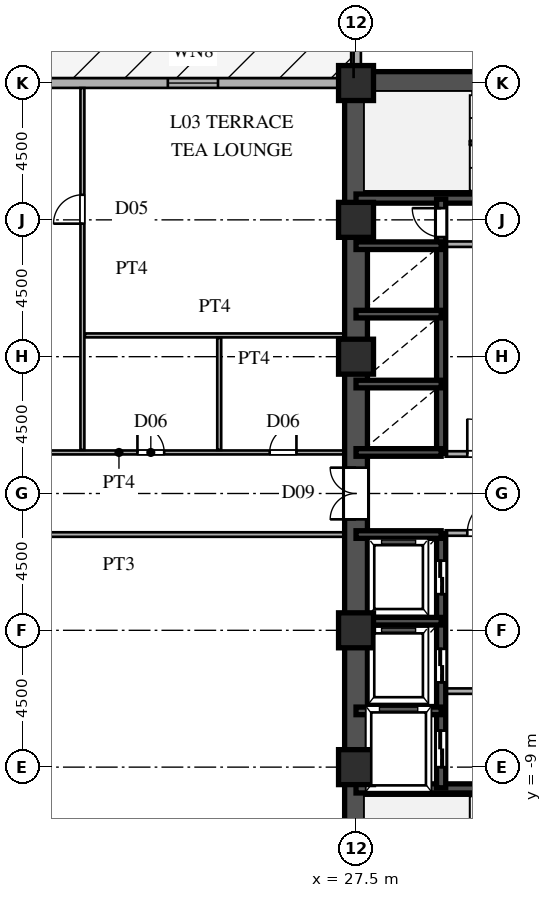
"""IFC4 building model, lengths in metres.
Left out: names, types, materials, properties, quantities, classifications, styles, units other than length and angle.
Written with IfcOpenShell. Run it as: python <this file> out.ifc"""

import sys

from ifc_helpers import new_model, si_unit, direction, frame, frame_2d, origin, origin_2d, place, context, subcontext, project, spatial, rectangle, hollow_rectangle, extrude, source, transform, mapped, element, fill, save


model = new_model("IFC4")
c1 = context("Model", 3, precision=1e-05, world=origin(), true_north=direction((0.0, 1.0)))
c2 = subcontext(c1, "Body", "Model", "MODEL_VIEW")
j1 = project(units=[si_unit("LENGTHUNIT", "METRE"), si_unit("PLANEANGLEUNIT", "RADIAN")], contexts=[c1])
p1 = place(None, origin())
s1 = spatial("IfcSite", under=j1, at=p1, CompositionType="ELEMENT")
p2 = place(p1, origin())
s2 = spatial("IfcBuilding", under=s1, at=p2, CompositionType="ELEMENT")
p3 = place(p2, frame((0.0, 0.0, 14.4)))
s3 = spatial("IfcBuildingStorey", under=s2, at=p3, CompositionType="ELEMENT", Elevation=14.4)
m1 = source(origin(), c2, "Body", "SweptSolid", [
    extrude(hollow_rectangle(XDim=1.15, YDim=1.15, WallThickness=0.048, at=origin_2d()), origin(), (0.0, 0.0, 1.0), 4.5),
])
for number, where, z_axis, x_axis in (
    (1, (27.5, -9.0, 0.0), (0.0, 0.0, 1.0), (1.0, 0.0, 0.0)),
    (2, (27.5, -4.5, 0.0), (0.0, 0.0, 1.0), (1.0, 0.0, 0.0)),
    (3, (27.5, 4.5, 0.0), (0.0, 0.0, 1.0), (1.0, 0.0, 0.0)),
    (4, (27.5, 9.0, 0.0), (0.0, 0.0, 1.0), (1.0, 0.0, 0.0)),
    (5, (27.5, 13.5, 0.0), (0.0, 0.0, 1.0), (1.0, 0.0, 0.0)),
):
    element("IfcColumn", number, at=place(p3, frame(where, z_axis=z_axis, x_axis=x_axis)), inside=s3, PredefinedType="COLUMN", context=c2, shape_type="MappedRepresentation", body=[
        mapped(m1, transform((0.0, 0.0, 0.0), scale=1.0)),
    ])
p4 = place(p3, frame((30.537, -26.985, 0.0), z_axis=(0.0, 0.0, 1.0), x_axis=(0.926944846568, 0.375197616492, 0.0)))
e6 = element("IfcWall", 6, at=p4, inside=s3, PredefinedType="SOLIDWALL", context=c2, shape_type="SweptSolid", body=[
    extrude(rectangle(XDim=45.23, YDim=0.32, at=frame_2d((22.615, 0.0))), origin(), (0.0, 0.0, 1.0), 4.28),
])
p5 = place(p4, frame((6.0, 0.0, 0.85)))
e7 = element("IfcOpeningElement", 7, at=p5, cuts=e6, PredefinedType="OPENING", context=c2, shape_type="SweptSolid", body=[
    extrude(rectangle(XDim=1.8, YDim=2.0, at=frame_2d((0.9, 1.0))), frame((0.0, 0.17, 0.0), z_axis=(0.0, -1.0, 0.0), x_axis=(1.0, 0.0, 0.0)), (0.0, 0.0, 1.0), 0.34),
])
p6 = place(p4, frame((36.23, 0.0, 0.85)))
e8 = element("IfcOpeningElement", 8, at=p6, cuts=e6, PredefinedType="OPENING", context=c2, shape_type="SweptSolid", body=[
    extrude(rectangle(XDim=1.8, YDim=2.0, at=frame_2d((0.9, 1.0))), frame((0.0, 0.17, 0.0), z_axis=(0.0, -1.0, 0.0), x_axis=(1.0, 0.0, 0.0)), (0.0, 0.0, 1.0), 0.34),
])
p7 = place(p3, frame((72.463, 10.015, 0.0), z_axis=(0.0, 0.0, 1.0), x_axis=(-0.926944846568, 0.375197616492, 0.0)))
e9 = element("IfcWall", 9, at=p7, inside=s3, PredefinedType="SOLIDWALL", context=c2, shape_type="SweptSolid", body=[
    extrude(rectangle(XDim=45.23, YDim=0.32, at=frame_2d((22.615, 0.0))), origin(), (0.0, 0.0, 1.0), 4.28),
])
p8 = place(p7, frame((6.0, 0.0, 0.85)))
e10 = element("IfcOpeningElement", 10, at=p8, cuts=e9, PredefinedType="OPENING", context=c2, shape_type="SweptSolid", body=[
    extrude(rectangle(XDim=1.8, YDim=2.0, at=frame_2d((0.9, 1.0))), frame((0.0, 0.17, 0.0), z_axis=(0.0, -1.0, 0.0), x_axis=(1.0, 0.0, 0.0)), (0.0, 0.0, 1.0), 0.34),
])
p9 = place(p7, frame((36.23, 0.0, 0.85)))
e11 = element("IfcOpeningElement", 11, at=p9, cuts=e9, PredefinedType="OPENING", context=c2, shape_type="SweptSolid", body=[
    extrude(rectangle(XDim=1.8, YDim=2.0, at=frame_2d((0.9, 1.0))), frame((0.0, 0.17, 0.0), z_axis=(0.0, -1.0, 0.0), x_axis=(1.0, 0.0, 0.0)), (0.0, 0.0, 1.0), 0.34),
])
p10 = place(p3, frame((27.5, 13.55, 0.0), z_axis=(0.0, 0.0, 1.0), x_axis=(0.0, 1.0, 0.0)))
e12 = element("IfcWall", 12, at=p10, inside=s3, PredefinedType="SOLIDWALL", context=c2, shape_type="SweptSolid", body=[
    extrude(rectangle(XDim=10.4, YDim=0.32, at=frame_2d((5.2, 0.0))), origin(), (0.0, 0.0, 1.0), 2.78),
])
p11 = place(p3, frame((27.46, 13.5, 0.0), z_axis=(0.0, 0.0, 1.0), x_axis=(-1.0, 0.0, 0.0)))
e13 = element("IfcWall", 13, at=p11, inside=s3, PredefinedType="SOLIDWALL", context=c2, shape_type="SweptSolid", body=[
    extrude(rectangle(XDim=54.92, YDim=0.32, at=frame_2d((27.46, 0.0))), origin(), (0.0, 0.0, 1.0), 4.28),
])
p12 = place(p11, frame((34.4, 0.0, 0.0)))
e14 = element("IfcOpeningElement", 14, at=p12, cuts=e13, PredefinedType="OPENING", context=c2, shape_type="SweptSolid", body=[
    extrude(rectangle(XDim=1.8, YDim=2.3, at=frame_2d((0.9, 1.15))), frame((0.0, 0.17, 0.0), z_axis=(0.0, -1.0, 0.0), x_axis=(1.0, 0.0, 0.0)), (0.0, 0.0, 1.0), 0.34),
])
p13 = place(p11, frame((37.4, 0.0, 0.0)))
e15 = element("IfcOpeningElement", 15, at=p13, cuts=e13, PredefinedType="OPENING", context=c2, shape_type="SweptSolid", body=[
    extrude(rectangle(XDim=1.8, YDim=2.3, at=frame_2d((0.9, 1.15))), frame((0.0, 0.17, 0.0), z_axis=(0.0, -1.0, 0.0), x_axis=(1.0, 0.0, 0.0)), (0.0, 0.0, 1.0), 0.34),
])
p14 = place(p11, frame((4.5, 0.0, 0.8)))
e16 = element("IfcOpeningElement", 16, at=p14, cuts=e13, PredefinedType="OPENING", context=c2, shape_type="SweptSolid", body=[
    extrude(rectangle(XDim=1.65, YDim=1.85, at=frame_2d((0.825, 0.925))), frame((0.0, 0.17, 0.0), z_axis=(0.0, -1.0, 0.0), x_axis=(1.0, 0.0, 0.0)), (0.0, 0.0, 1.0), 0.34),
])
p15 = place(p11, frame((25.0, 0.0, 0.8)))
e17 = element("IfcOpeningElement", 17, at=p15, cuts=e13, PredefinedType="OPENING", context=c2, shape_type="SweptSolid", body=[
    extrude(rectangle(XDim=1.65, YDim=1.85, at=frame_2d((0.825, 0.925))), frame((0.0, 0.17, 0.0), z_axis=(0.0, -1.0, 0.0), x_axis=(1.0, 0.0, 0.0)), (0.0, 0.0, 1.0), 0.34),
])
p16 = place(p11, frame((46.42, 0.0, 0.8)))
e18 = element("IfcOpeningElement", 18, at=p16, cuts=e13, PredefinedType="OPENING", context=c2, shape_type="SweptSolid", body=[
    extrude(rectangle(XDim=1.65, YDim=1.85, at=frame_2d((0.825, 0.925))), frame((0.0, 0.17, 0.0), z_axis=(0.0, -1.0, 0.0), x_axis=(1.0, 0.0, 0.0)), (0.0, 0.0, 1.0), 0.34),
])
for number, where, z_axis, x_axis in (
    (19, (27.5, -13.5, 0.0), (0.0, 0.0, 1.0), (0.0, 1.0, 0.0)),
    (20, (27.5, 1.3, 0.0), (0.0, 0.0, 1.0), (0.0, 1.0, 0.0)),
):
    element("IfcWall", number, at=place(p3, frame(where, z_axis=z_axis, x_axis=x_axis)), inside=s3, PredefinedType="SHEAR", context=c2, shape_type="SweptSolid", body=[
        extrude(rectangle(XDim=12.2, YDim=0.75, at=frame_2d((6.1, 0.0))), origin(), (0.0, 0.0, 1.0), 4.28),
    ])
p17 = place(p3, frame((27.5, -1.3, 0.0), z_axis=(0.0, 0.0, 1.0), x_axis=(0.0, 1.0, 0.0)))
e21 = element("IfcWall", 21, at=p17, inside=s3, PredefinedType="SHEAR", context=c2, shape_type="SweptSolid", body=[
    extrude(rectangle(XDim=2.6, YDim=0.75, at=frame_2d((1.3, 0.0))), origin(), (0.0, 0.0, 1.0), 4.28),
])
p18 = place(p17, frame((0.45, 0.0, 0.0)))
e22 = element("IfcOpeningElement", 22, at=p18, cuts=e21, PredefinedType="OPENING", context=c2, shape_type="SweptSolid", body=[
    extrude(rectangle(XDim=1.7, YDim=2.35, at=frame_2d((0.85, 1.175))), frame((0.0, 0.385, 0.0), z_axis=(0.0, -1.0, 0.0), x_axis=(1.0, 0.0, 0.0)), (0.0, 0.0, 1.0), 0.77),
])
p19 = place(p3, frame((27.5, 13.5, 0.0), z_axis=(0.0, 0.0, 1.0), x_axis=(1.0, 0.0, 0.0)))
e23 = element("IfcWall", 23, at=p19, inside=s3, PredefinedType="SHEAR", context=c2, shape_type="SweptSolid", body=[
    extrude(rectangle(XDim=9.0, YDim=0.75, at=frame_2d((4.5, 0.0))), origin(), (0.0, 0.0, 1.0), 4.28),
])
p20 = place(p3, frame((27.5, -9.7, 0.0), z_axis=(0.0, 0.0, 1.0), x_axis=(1.0, 0.0, 0.0)))
e24 = element("IfcWall", 24, at=p20, inside=s3, PredefinedType="SHEAR", context=c2, shape_type="SweptSolid", body=[
    extrude(rectangle(XDim=9.0, YDim=0.3, at=frame_2d((4.5, 0.0))), origin(), (0.0, 0.0, 1.0), 4.28),
])
p21 = place(p20, frame((7.3, 0.0, 0.0)))
e25 = element("IfcOpeningElement", 25, at=p21, cuts=e24, PredefinedType="OPENING", context=c2, shape_type="SweptSolid", body=[
    extrude(rectangle(XDim=1.1, YDim=2.2, at=frame_2d((0.55, 1.1))), frame((0.0, 0.16, 0.0), z_axis=(0.0, -1.0, 0.0), x_axis=(1.0, 0.0, 0.0)), (0.0, 0.0, 1.0), 0.32),
])
p22 = place(p3, frame((27.5, 9.7, 0.0), z_axis=(0.0, 0.0, 1.0), x_axis=(1.0, 0.0, 0.0)))
e26 = element("IfcWall", 26, at=p22, inside=s3, PredefinedType="SHEAR", context=c2, shape_type="SweptSolid", body=[
    extrude(rectangle(XDim=9.0, YDim=0.3, at=frame_2d((4.5, 0.0))), origin(), (0.0, 0.0, 1.0), 4.28),
])
p23 = place(p22, frame((7.3, 0.0, 0.0)))
e27 = element("IfcOpeningElement", 27, at=p23, cuts=e26, PredefinedType="OPENING", context=c2, shape_type="SweptSolid", body=[
    extrude(rectangle(XDim=1.1, YDim=2.2, at=frame_2d((0.55, 1.1))), frame((0.0, 0.16, 0.0), z_axis=(0.0, -1.0, 0.0), x_axis=(1.0, 0.0, 0.0)), (0.0, 0.0, 1.0), 0.32),
])
for number, where, z_axis, x_axis in (
    (28, (27.5, -7.15, 0.0), (0.0, 0.0, 1.0), (1.0, 0.0, 0.0)),
    (29, (27.5, -4.2, 0.0), (0.0, 0.0, 1.0), (1.0, 0.0, 0.0)),
    (30, (27.5, -1.35, 0.0), (0.0, 0.0, 1.0), (1.0, 0.0, 0.0)),
    (31, (27.5, 1.35, 0.0), (0.0, 0.0, 1.0), (1.0, 0.0, 0.0)),
    (32, (27.5, 3.6, 0.0), (0.0, 0.0, 1.0), (1.0, 0.0, 0.0)),
    (33, (27.5, 5.9, 0.0), (0.0, 0.0, 1.0), (1.0, 0.0, 0.0)),
    (34, (27.5, 8.15, 0.0), (0.0, 0.0, 1.0), (1.0, 0.0, 0.0)),
):
    element("IfcWall", number, at=place(p3, frame(where, z_axis=z_axis, x_axis=x_axis)), inside=s3, PredefinedType="SHEAR", context=c2, shape_type="SweptSolid", body=[
        extrude(rectangle(XDim=2.8, YDim=0.25, at=frame_2d((1.4, 0.0))), origin(), (0.0, 0.0, 1.0), 4.28),
    ])
p24 = place(p3, frame((30.3, -9.68, 0.0), z_axis=(0.0, 0.0, 1.0), x_axis=(0.0, 1.0, 0.0)))
e35 = element("IfcWall", 35, at=p24, inside=s3, PredefinedType="SHEAR", context=c2, shape_type="SweptSolid", body=[
    extrude(rectangle(XDim=2.56, YDim=0.3, at=frame_2d((1.28, 0.0))), origin(), (0.0, 0.0, 1.0), 4.28),
])
p25 = place(p24, frame((0.68, 0.0, 0.0)))
e36 = element("IfcOpeningElement", 36, at=p25, cuts=e35, PredefinedType="OPENING", context=c2, shape_type="SweptSolid", body=[
    extrude(rectangle(XDim=1.2, YDim=2.25, at=frame_2d((0.6, 1.125))), frame((0.0, 0.16, 0.0), z_axis=(0.0, -1.0, 0.0), x_axis=(1.0, 0.0, 0.0)), (0.0, 0.0, 1.0), 0.32),
])
p26 = place(p3, frame((30.3, -7.12, 0.0), z_axis=(0.0, 0.0, 1.0), x_axis=(0.0, 1.0, 0.0)))
e37 = element("IfcWall", 37, at=p26, inside=s3, PredefinedType="SHEAR", context=c2, shape_type="SweptSolid", body=[
    extrude(rectangle(XDim=2.92, YDim=0.3, at=frame_2d((1.46, 0.0))), origin(), (0.0, 0.0, 1.0), 4.28),
])
p27 = place(p26, frame((0.91, 0.0, 0.0)))
e38 = element("IfcOpeningElement", 38, at=p27, cuts=e37, PredefinedType="OPENING", context=c2, shape_type="SweptSolid", body=[
    extrude(rectangle(XDim=1.1, YDim=2.2, at=frame_2d((0.55, 1.1))), frame((0.0, 0.16, 0.0), z_axis=(0.0, -1.0, 0.0), x_axis=(1.0, 0.0, 0.0)), (0.0, 0.0, 1.0), 0.32),
])
p28 = place(p3, frame((30.3, -4.2, 0.0), z_axis=(0.0, 0.0, 1.0), x_axis=(0.0, 1.0, 0.0)))
e39 = element("IfcWall", 39, at=p28, inside=s3, PredefinedType="SHEAR", context=c2, shape_type="SweptSolid", body=[
    extrude(rectangle(XDim=2.88, YDim=0.3, at=frame_2d((1.44, 0.0))), origin(), (0.0, 0.0, 1.0), 4.28),
])
p29 = place(p28, frame((0.89, 0.0, 0.0)))
e40 = element("IfcOpeningElement", 40, at=p29, cuts=e39, PredefinedType="OPENING", context=c2, shape_type="SweptSolid", body=[
    extrude(rectangle(XDim=1.1, YDim=2.2, at=frame_2d((0.55, 1.1))), frame((0.0, 0.16, 0.0), z_axis=(0.0, -1.0, 0.0), x_axis=(1.0, 0.0, 0.0)), (0.0, 0.0, 1.0), 0.32),
])
p30 = place(p3, frame((30.3, 1.32, 0.0), z_axis=(0.0, 0.0, 1.0), x_axis=(0.0, 1.0, 0.0)))
e41 = element("IfcWall", 41, at=p30, inside=s3, PredefinedType="SHEAR", context=c2, shape_type="SweptSolid", body=[
    extrude(rectangle(XDim=2.28, YDim=0.3, at=frame_2d((1.14, 0.0))), origin(), (0.0, 0.0, 1.0), 4.28),
])
p31 = place(p3, frame((30.3, 3.6, 0.0), z_axis=(0.0, 0.0, 1.0), x_axis=(0.0, 1.0, 0.0)))
e42 = element("IfcWall", 42, at=p31, inside=s3, PredefinedType="SHEAR", context=c2, shape_type="SweptSolid", body=[
    extrude(rectangle(XDim=2.3, YDim=0.3, at=frame_2d((1.15, 0.0))), origin(), (0.0, 0.0, 1.0), 4.28),
])
p32 = place(p3, frame((30.3, 5.9, 0.0), z_axis=(0.0, 0.0, 1.0), x_axis=(0.0, 1.0, 0.0)))
e43 = element("IfcWall", 43, at=p32, inside=s3, PredefinedType="SHEAR", context=c2, shape_type="SweptSolid", body=[
    extrude(rectangle(XDim=2.25, YDim=0.3, at=frame_2d((1.125, 0.0))), origin(), (0.0, 0.0, 1.0), 4.28),
])
p33 = place(p3, frame((30.3, 8.15, 0.0), z_axis=(0.0, 0.0, 1.0), x_axis=(0.0, 1.0, 0.0)))
e44 = element("IfcWall", 44, at=p33, inside=s3, PredefinedType="SHEAR", context=c2, shape_type="SweptSolid", body=[
    extrude(rectangle(XDim=1.53, YDim=0.3, at=frame_2d((0.765, 0.0))), origin(), (0.0, 0.0, 1.0), 4.28),
])
p34 = place(p33, frame((0.285, 0.0, 0.0)))
e45 = element("IfcOpeningElement", 45, at=p34, cuts=e44, PredefinedType="OPENING", context=c2, shape_type="SweptSolid", body=[
    extrude(rectangle(XDim=0.95, YDim=2.15, at=frame_2d((0.475, 1.075))), frame((0.0, 0.16, 0.0), z_axis=(0.0, -1.0, 0.0), x_axis=(1.0, 0.0, 0.0)), (0.0, 0.0, 1.0), 0.32),
])
for number, where, z_axis, x_axis in (
    (46, (30.45, -6.5, 0.0), (0.0, 0.0, 1.0), (1.0, 0.0, 0.0)),
    (47, (30.45, 8.2, 0.0), (0.0, 0.0, 1.0), (1.0, 0.0, 0.0)),
):
    element("IfcWall", number, at=place(p3, frame(where, z_axis=z_axis, x_axis=x_axis)), inside=s3, PredefinedType="PARTITIONING", context=c2, shape_type="SweptSolid", body=[
        extrude(rectangle(XDim=5.7, YDim=0.18, at=frame_2d((2.85, 0.0))), origin(), (0.0, 0.0, 1.0), 4.28),
    ])
p35 = place(p3, frame((30.45, -1.3, 0.0), z_axis=(0.0, 0.0, 1.0), x_axis=(1.0, 0.0, 0.0)))
e48 = element("IfcWall", 48, at=p35, inside=s3, PredefinedType="PARTITIONING", context=c2, shape_type="SweptSolid", body=[
    extrude(rectangle(XDim=2.57, YDim=0.18, at=frame_2d((1.285, 0.0))), origin(), (0.0, 0.0, 1.0), 4.28),
])
p36 = place(p35, frame((0.71, 0.0, 0.0)))
e49 = element("IfcOpeningElement", 49, at=p36, cuts=e48, PredefinedType="OPENING", context=c2, shape_type="SweptSolid", body=[
    extrude(rectangle(XDim=1.15, YDim=2.2, at=frame_2d((0.575, 1.1))), frame((0.0, 0.1, 0.0), z_axis=(0.0, -1.0, 0.0), x_axis=(1.0, 0.0, 0.0)), (0.0, 0.0, 1.0), 0.2),
])
p37 = place(p3, frame((30.45, 1.3, 0.0), z_axis=(0.0, 0.0, 1.0), x_axis=(1.0, 0.0, 0.0)))
e50 = element("IfcWall", 50, at=p37, inside=s3, PredefinedType="PARTITIONING", context=c2, shape_type="SweptSolid", body=[
    extrude(rectangle(XDim=2.57, YDim=0.18, at=frame_2d((1.285, 0.0))), origin(), (0.0, 0.0, 1.0), 4.28),
])
p38 = place(p37, frame((0.71, 0.0, 0.0)))
e51 = element("IfcOpeningElement", 51, at=p38, cuts=e50, PredefinedType="OPENING", context=c2, shape_type="SweptSolid", body=[
    extrude(rectangle(XDim=1.15, YDim=2.2, at=frame_2d((0.575, 1.1))), frame((0.0, 0.1, 0.0), z_axis=(0.0, -1.0, 0.0), x_axis=(1.0, 0.0, 0.0)), (0.0, 0.0, 1.0), 0.2),
])
p39 = place(p3, frame((12.285, -1.35, 0.0), z_axis=(0.0, 0.0, 1.0), x_axis=(1.0, 0.0, 0.0)))
e52 = element("IfcWall", 52, at=p39, inside=s3, PredefinedType="PARTITIONING", context=c2, shape_type="SweptSolid", body=[
    extrude(rectangle(XDim=14.835, YDim=0.15, at=frame_2d((7.417, 0.0))), origin(), (0.0, 0.0, 1.0), 4.28),
])
p40 = place(p3, frame((12.285, 1.35, 0.0), z_axis=(0.0, 0.0, 1.0), x_axis=(1.0, 0.0, 0.0)))
e53 = element("IfcWall", 53, at=p40, inside=s3, PredefinedType="PARTITIONING", context=c2, shape_type="SweptSolid", body=[
    extrude(rectangle(XDim=14.835, YDim=0.13, at=frame_2d((7.417, 0.0))), origin(), (0.0, 0.0, 1.0), 4.28),
])
p41 = place(p40, frame((8.025, 0.0, 0.0)))
e54 = element("IfcOpeningElement", 54, at=p41, cuts=e53, PredefinedType="OPENING", context=c2, shape_type="SweptSolid", body=[
    extrude(rectangle(XDim=0.88, YDim=2.1, at=frame_2d((0.44, 1.05))), frame((0.0, 0.075, 0.0), z_axis=(0.0, -1.0, 0.0), x_axis=(1.0, 0.0, 0.0)), (0.0, 0.0, 1.0), 0.15),
])
p42 = place(p40, frame((12.375, 0.0, 0.0)))
e55 = element("IfcOpeningElement", 55, at=p42, cuts=e53, PredefinedType="OPENING", context=c2, shape_type="SweptSolid", body=[
    extrude(rectangle(XDim=0.88, YDim=2.1, at=frame_2d((0.44, 1.05))), frame((0.0, 0.075, 0.0), z_axis=(0.0, -1.0, 0.0), x_axis=(1.0, 0.0, 0.0)), (0.0, 0.0, 1.0), 0.15),
])
p43 = place(p3, frame((18.585, 5.2, 0.0), z_axis=(0.0, 0.0, 1.0), x_axis=(1.0, 0.0, 0.0)))
e56 = element("IfcWall", 56, at=p43, inside=s3, PredefinedType="PARTITIONING", context=c2, shape_type="SweptSolid", body=[
    extrude(rectangle(XDim=8.535, YDim=0.13, at=frame_2d((4.268, 0.0))), origin(), (0.0, 0.0, 1.0), 4.28),
])
p44 = place(p3, frame((18.5, 1.435, 0.0), z_axis=(0.0, 0.0, 1.0), x_axis=(0.0, 1.0, 0.0)))
e57 = element("IfcWall", 57, at=p44, inside=s3, PredefinedType="PARTITIONING", context=c2, shape_type="SweptSolid", body=[
    extrude(rectangle(XDim=11.9, YDim=0.13, at=frame_2d((5.95, 0.0))), origin(), (0.0, 0.0, 1.0), 4.28),
])
p45 = place(p44, frame((7.44, 0.0, 0.0)))
e58 = element("IfcOpeningElement", 58, at=p45, cuts=e57, PredefinedType="OPENING", context=c2, shape_type="SweptSolid", body=[
    extrude(rectangle(XDim=0.95, YDim=2.15, at=frame_2d((0.475, 1.075))), frame((0.0, 0.075, 0.0), z_axis=(0.0, -1.0, 0.0), x_axis=(1.0, 0.0, 0.0)), (0.0, 0.0, 1.0), 0.15),
])
p46 = place(p3, frame((23.0, 1.435, 0.0), z_axis=(0.0, 0.0, 1.0), x_axis=(0.0, 1.0, 0.0)))
e59 = element("IfcWall", 59, at=p46, inside=s3, PredefinedType="PARTITIONING", context=c2, shape_type="SweptSolid", body=[
    extrude(rectangle(XDim=3.68, YDim=0.13, at=frame_2d((1.84, 0.0))), origin(), (0.0, 0.0, 1.0), 4.28),
])
m2 = source(origin(), c2, "Body", "SweptSolid", [
    extrude(rectangle(XDim=1.65, YDim=1.85, at=frame_2d((0.825, 0.925))), frame((0.0, 0.03, 0.0), z_axis=(0.0, -1.0, 0.0), x_axis=(1.0, 0.0, 0.0)), (0.0, 0.0, 1.0), 0.06),
])
p47 = place(p14, origin())
e60 = element("IfcWindow", 60, at=p47, inside=s3, PartitioningType="SINGLE_PANEL", PredefinedType="WINDOW", context=c2, shape_type="MappedRepresentation", body=[
    mapped(m2, transform((0.0, 0.0, 0.0), scale=1.0)),
])
fill(e16, e60)
m3 = source(origin(), c2, "Body", "SweptSolid", [
    extrude(rectangle(XDim=1.7, YDim=2.35, at=frame_2d((0.85, 1.175))), frame((0.0, 0.025, 0.0), z_axis=(0.0, -1.0, 0.0), x_axis=(1.0, 0.0, 0.0)), (0.0, 0.0, 1.0), 0.05),
])
p48 = place(p18, origin())
e61 = element("IfcDoor", 61, at=p48, inside=s3, OperationType="DOUBLE_SWING_LEFT", PredefinedType="DOOR", context=c2, shape_type="MappedRepresentation", body=[
    mapped(m3, transform((0.0, 0.0, 0.0), scale=1.0)),
])
fill(e22, e61)
m4 = source(origin(), c2, "Body", "SweptSolid", [
    extrude(rectangle(XDim=1.2, YDim=2.25, at=frame_2d((0.6, 1.125))), frame((0.0, 0.025, 0.0), z_axis=(0.0, -1.0, 0.0), x_axis=(1.0, 0.0, 0.0)), (0.0, 0.0, 1.0), 0.05),
])
p49 = place(p25, origin())
e62 = element("IfcDoor", 62, at=p49, inside=s3, OperationType="DOUBLE_DOOR_SLIDING", PredefinedType="DOOR", context=c2, shape_type="MappedRepresentation", body=[
    mapped(m4, transform((0.0, 0.0, 0.0), scale=1.0)),
])
fill(e36, e62)
m5 = source(origin(), c2, "Body", "SweptSolid", [
    extrude(rectangle(XDim=1.1, YDim=2.2, at=frame_2d((0.55, 1.1))), frame((0.0, 0.025, 0.0), z_axis=(0.0, -1.0, 0.0), x_axis=(1.0, 0.0, 0.0)), (0.0, 0.0, 1.0), 0.05),
])
p50 = place(p27, origin())
e63 = element("IfcDoor", 63, at=p50, inside=s3, OperationType="DOUBLE_DOOR_SLIDING", PredefinedType="DOOR", context=c2, shape_type="MappedRepresentation", body=[
    mapped(m5, transform((0.0, 0.0, 0.0), scale=1.0)),
])
fill(e38, e63)
p51 = place(p29, origin())
e64 = element("IfcDoor", 64, at=p51, inside=s3, OperationType="DOUBLE_DOOR_SLIDING", PredefinedType="DOOR", context=c2, shape_type="MappedRepresentation", body=[
    mapped(m5, transform((0.0, 0.0, 0.0), scale=1.0)),
])
fill(e40, e64)
m6 = source(origin(), c2, "Body", "SweptSolid", [
    extrude(rectangle(XDim=0.95, YDim=2.15, at=frame_2d((0.475, 1.075))), frame((0.0, 0.025, 0.0), z_axis=(0.0, -1.0, 0.0), x_axis=(1.0, 0.0, 0.0)), (0.0, 0.0, 1.0), 0.05),
])
p52 = place(p34, origin())
e65 = element("IfcDoor", 65, at=p52, inside=s3, OperationType="SINGLE_SWING_RIGHT", PredefinedType="DOOR", context=c2, shape_type="MappedRepresentation", body=[
    mapped(m6, transform((0.0, 0.0, 0.0), scale=1.0)),
])
fill(e45, e65)
m7 = source(origin(), c2, "Body", "SweptSolid", [
    extrude(rectangle(XDim=1.15, YDim=2.2, at=frame_2d((0.575, 1.1))), frame((0.0, 0.025, 0.0), z_axis=(0.0, -1.0, 0.0), x_axis=(1.0, 0.0, 0.0)), (0.0, 0.0, 1.0), 0.05),
])
p53 = place(p36, origin())
e66 = element("IfcDoor", 66, at=p53, inside=s3, OperationType="SINGLE_SWING_RIGHT", PredefinedType="DOOR", context=c2, shape_type="MappedRepresentation", body=[
    mapped(m7, transform((0.0, 0.0, 0.0), scale=1.0)),
])
fill(e49, e66)
p54 = place(p38, origin())
e67 = element("IfcDoor", 67, at=p54, inside=s3, OperationType="SINGLE_SWING_LEFT", PredefinedType="DOOR", context=c2, shape_type="MappedRepresentation", body=[
    mapped(m7, transform((0.0, 0.0, 0.0), scale=1.0)),
])
fill(e51, e67)
m8 = source(origin(), c2, "Body", "SweptSolid", [
    extrude(rectangle(XDim=0.88, YDim=2.1, at=frame_2d((0.44, 1.05))), frame((0.0, 0.025, 0.0), z_axis=(0.0, -1.0, 0.0), x_axis=(1.0, 0.0, 0.0)), (0.0, 0.0, 1.0), 0.05),
])
p55 = place(p41, origin())
e68 = element("IfcDoor", 68, at=p55, inside=s3, OperationType="SINGLE_SWING_LEFT", PredefinedType="DOOR", context=c2, shape_type="MappedRepresentation", body=[
    mapped(m8, transform((0.0, 0.0, 0.0), scale=1.0)),
])
fill(e54, e68)
p56 = place(p42, origin())
e69 = element("IfcDoor", 69, at=p56, inside=s3, OperationType="SINGLE_SWING_RIGHT", PredefinedType="DOOR", context=c2, shape_type="MappedRepresentation", body=[
    mapped(m8, transform((0.0, 0.0, 0.0), scale=1.0)),
])
fill(e55, e69)
m9 = source(origin(), c2, "Body", "SweptSolid", [
    extrude(rectangle(XDim=0.95, YDim=2.15, at=frame_2d((0.475, 1.075))), frame((0.0, 0.025, 0.0), z_axis=(0.0, -1.0, 0.0), x_axis=(1.0, 0.0, 0.0)), (0.0, 0.0, 1.0), 0.05),
])
p57 = place(p45, origin())
e70 = element("IfcDoor", 70, at=p57, inside=s3, OperationType="SINGLE_SWING_LEFT", PredefinedType="DOOR", context=c2, shape_type="MappedRepresentation", body=[
    mapped(m9, transform((0.0, 0.0, 0.0), scale=1.0)),
])
fill(e58, e70)
save(model, sys.argv[1])
